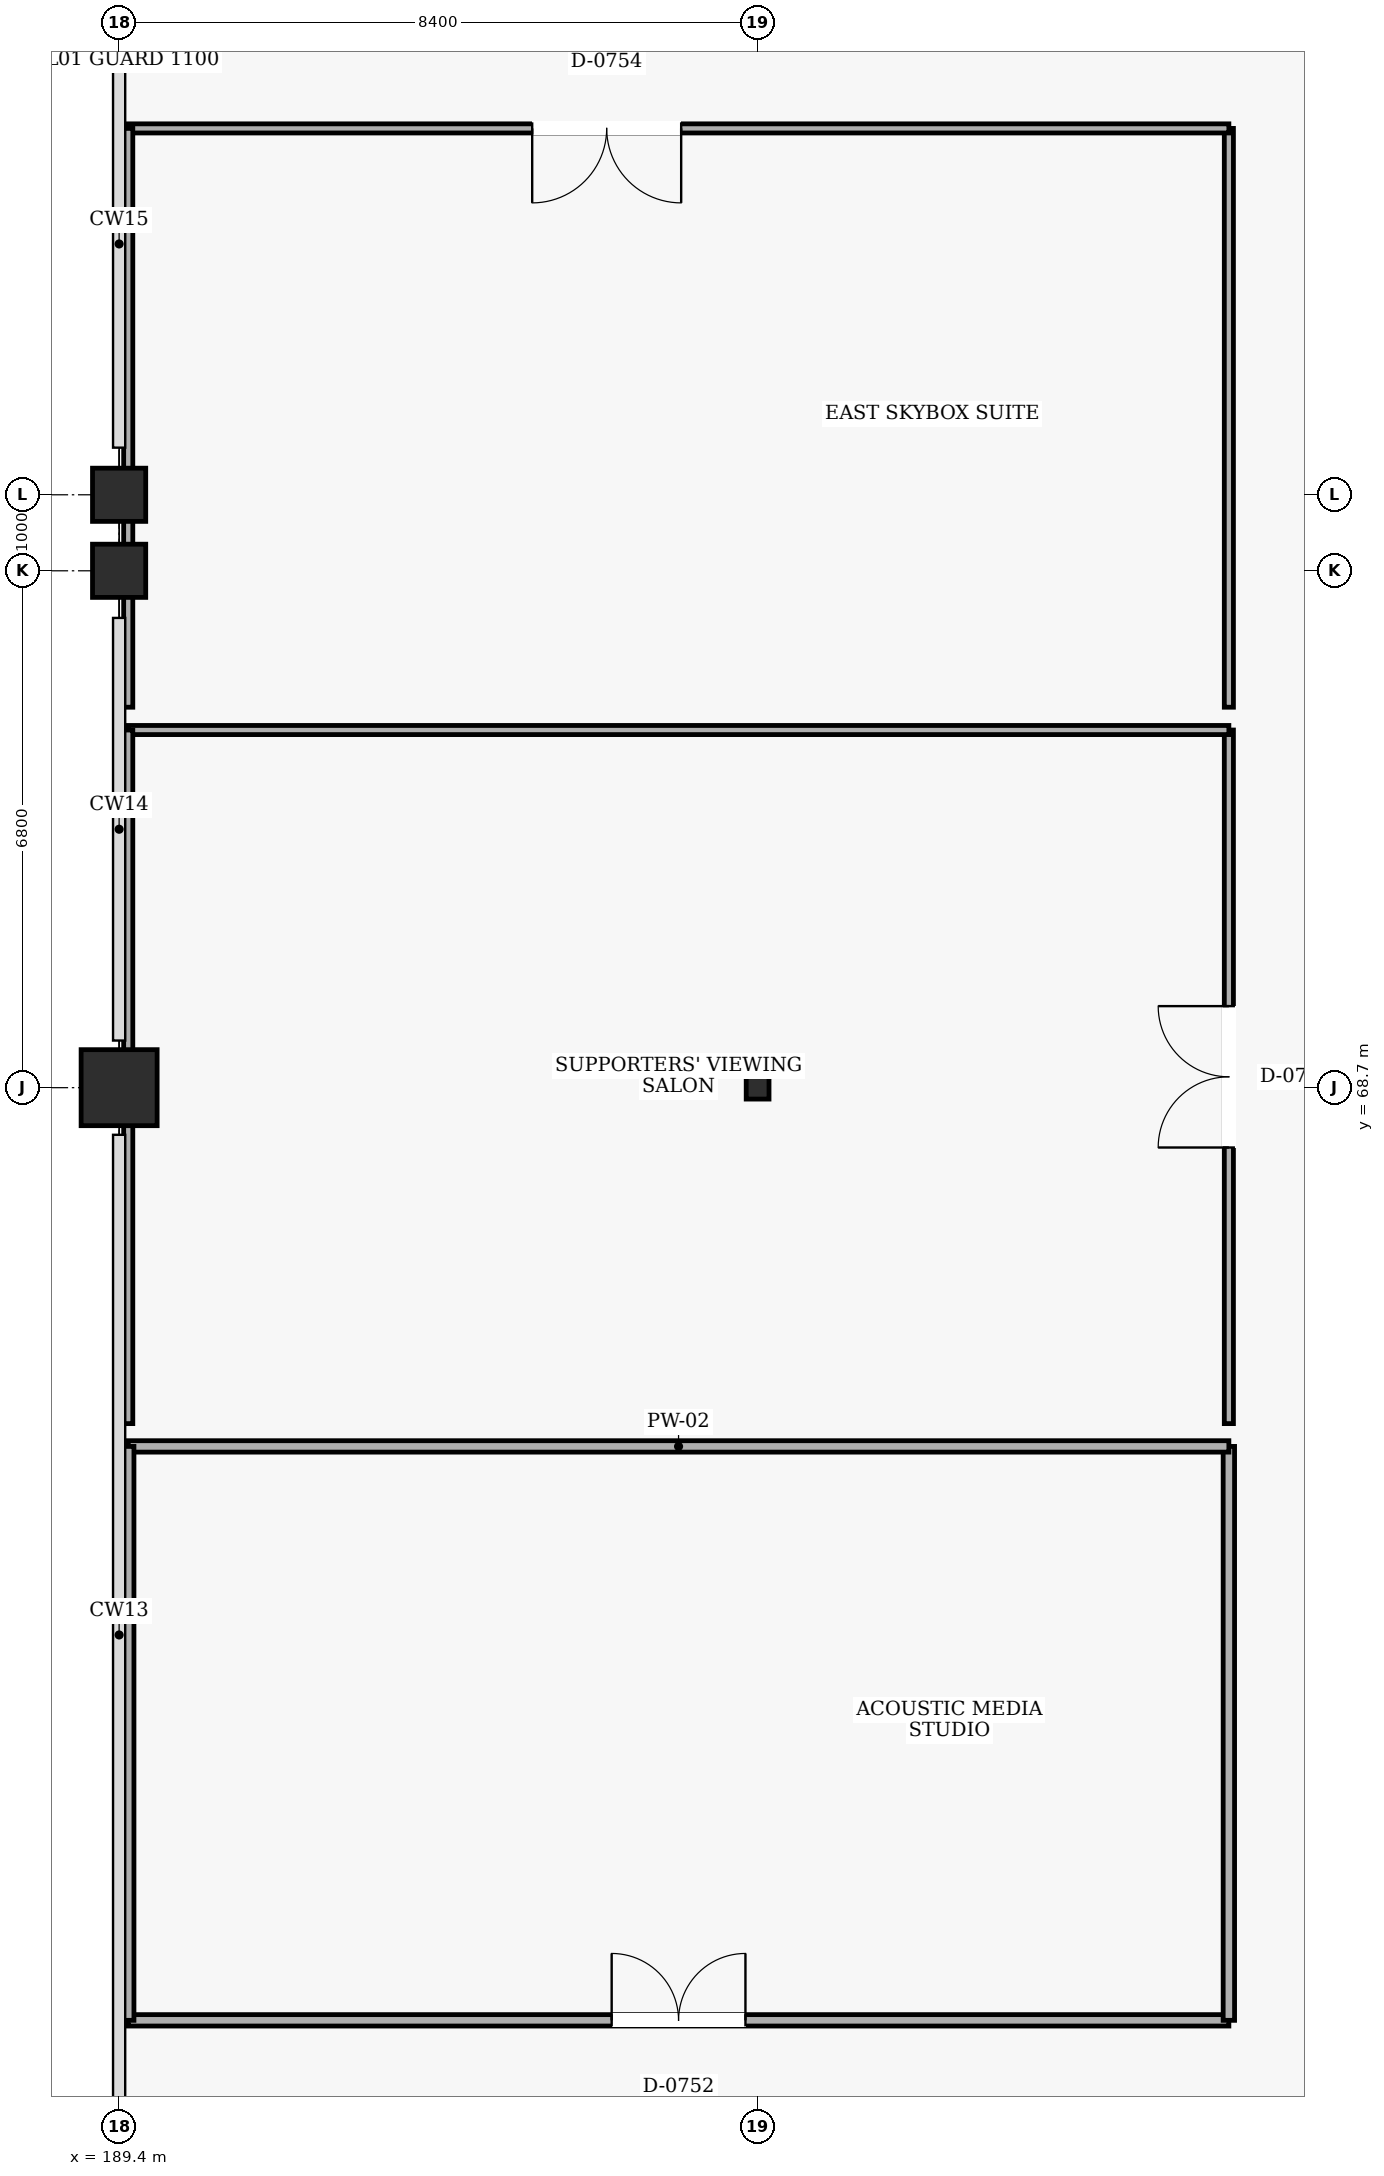
"""IFC4 building model, lengths in metres.
Left out: names, types, materials, properties, quantities, classifications, styles, units other than length and angle.
Written with IfcOpenShell. Run it as: python <this file> out.ifc"""

import sys

from ifc_helpers import new_model, si_unit, direction, frame, frame_2d, origin, origin_2d, place, context, subcontext, project, spatial, rectangle, hollow_rectangle, extrude, element, fill, save


model = new_model("IFC4")
c1 = context("Model", 3, precision=1e-05, world=origin(), true_north=direction((0.0, 1.0)))
c2 = subcontext(c1, "Body", "Model", "MODEL_VIEW")
j1 = project(units=[si_unit("LENGTHUNIT", "METRE"), si_unit("PLANEANGLEUNIT", "RADIAN")], contexts=[c1])
p1 = place(None, origin())
s1 = spatial("IfcSite", under=j1, at=p1, CompositionType="ELEMENT")
p2 = place(p1, origin())
s2 = spatial("IfcBuilding", under=s1, at=p2, CompositionType="ELEMENT")
p3 = place(p2, frame((0.0, 0.0, 19.8)))
s3 = spatial("IfcBuildingStorey", under=s2, at=p3, CompositionType="ELEMENT", Elevation=19.8)
p4 = place(p3, frame((189.4, 68.7, 0.0), z_axis=(0.0, 0.0, 1.0), x_axis=(1.0, 0.0, 0.0)))
e1 = element("IfcColumn", 1, at=p4, inside=s3, PredefinedType="COLUMN", context=c2, shape_type="SweptSolid", body=[
    extrude(rectangle(XDim=1.0, YDim=1.0, at=origin_2d()), origin(), (0.0, 0.0, 1.0), 4.8),
])
for number, where, z_axis, x_axis in (
    (2, (189.4, 75.5, 0.0), (0.0, 0.0, 1.0), (1.0, 0.0, 0.0)),
    (3, (189.4, 76.5, 0.0), (0.0, 0.0, 1.0), (1.0, 0.0, 0.0)),
):
    element("IfcColumn", number, at=place(p3, frame(where, z_axis=z_axis, x_axis=x_axis)), inside=s3, PredefinedType="COLUMN", context=c2, shape_type="SweptSolid", body=[
        extrude(rectangle(XDim=0.7, YDim=0.7, at=origin_2d()), origin(), (0.0, 0.0, 1.0), 4.8),
    ])
p5 = place(p3, frame((197.8, 68.7, 0.0), z_axis=(0.0, 0.0, 1.0), x_axis=(1.0, 0.0, 0.0)))
e4 = element("IfcColumn", 4, at=p5, inside=s3, PredefinedType="COLUMN", context=c2, shape_type="SweptSolid", body=[
    extrude(hollow_rectangle(XDim=0.3, YDim=0.3, WallThickness=0.016, at=origin_2d()), origin(), (0.0, 0.0, 1.0), 4.8),
])
p6 = place(p3, frame((189.52, 56.43, 0.0), z_axis=(0.0, 0.0, 1.0), x_axis=(1.0, 0.0, 0.0)))
e5 = element("IfcWall", 5, at=p6, inside=s3, PredefinedType="PARTITIONING", context=c2, shape_type="SweptSolid", body=[
    extrude(rectangle(XDim=14.48, YDim=0.15, at=frame_2d((7.24, 0.0))), origin(), (0.0, 0.0, 1.0), 4.5),
])
p7 = place(p6, frame((6.36, 0.0, 0.0)))
e6 = element("IfcOpeningElement", 6, at=p7, cuts=e5, PredefinedType="OPENING", context=c2, shape_type="SweptSolid", body=[
    extrude(rectangle(XDim=1.76, YDim=2.25, at=frame_2d((0.88, 1.125))), frame((0.0, 0.085, 0.0), z_axis=(0.0, -1.0, 0.0), x_axis=(1.0, 0.0, 0.0)), (0.0, 0.0, 1.0), 0.17),
])
p8 = place(p3, frame((204.0, 56.43, 0.0), z_axis=(0.0, 0.0, 1.0), x_axis=(0.0, 1.0, 0.0)))
e7 = element("IfcWall", 7, at=p8, inside=s3, PredefinedType="PARTITIONING", context=c2, shape_type="SweptSolid", body=[
    extrude(rectangle(XDim=7.551, YDim=0.15, at=frame_2d((3.775, 0.0))), origin(), (0.0, 0.0, 1.0), 4.5),
])
p9 = place(p3, frame((204.0, 63.98, 0.0), z_axis=(0.0, 0.0, 1.0), x_axis=(-1.0, 0.0, 0.0)))
e8 = element("IfcWall", 8, at=p9, inside=s3, PredefinedType="PARTITIONING", context=c2, shape_type="SweptSolid", body=[
    extrude(rectangle(XDim=14.48, YDim=0.15, at=frame_2d((7.24, 0.0))), origin(), (0.0, 0.0, 1.0), 4.5),
])
p10 = place(p3, frame((189.52, 63.98, 0.0), z_axis=(0.0, 0.0, 1.0), x_axis=(0.0, -1.0, 0.0)))
e9 = element("IfcWall", 9, at=p10, inside=s3, PredefinedType="PARTITIONING", context=c2, shape_type="SweptSolid", body=[
    extrude(rectangle(XDim=7.551, YDim=0.15, at=frame_2d((3.775, 0.0))), origin(), (0.0, 0.0, 1.0), 4.5),
])
p11 = place(p3, frame((204.0, 64.281, 0.0), z_axis=(0.0, 0.0, 1.0), x_axis=(0.0, 1.0, 0.0)))
e10 = element("IfcWall", 10, at=p11, inside=s3, PredefinedType="PARTITIONING", context=c2, shape_type="SweptSolid", body=[
    extrude(rectangle(XDim=9.125, YDim=0.12, at=frame_2d((4.562, 0.0))), origin(), (0.0, 0.0, 1.0), 4.5),
])
p12 = place(p11, frame((3.632, 0.0, 0.0)))
e11 = element("IfcOpeningElement", 11, at=p12, cuts=e10, PredefinedType="OPENING", context=c2, shape_type="SweptSolid", body=[
    extrude(rectangle(XDim=1.86, YDim=2.3, at=frame_2d((0.93, 1.15))), frame((0.0, 0.07, 0.0), z_axis=(0.0, -1.0, 0.0), x_axis=(1.0, 0.0, 0.0)), (0.0, 0.0, 1.0), 0.14),
])
p13 = place(p3, frame((204.0, 73.405, 0.0), z_axis=(0.0, 0.0, 1.0), x_axis=(-1.0, 0.0, 0.0)))
e12 = element("IfcWall", 12, at=p13, inside=s3, PredefinedType="PARTITIONING", context=c2, shape_type="SweptSolid", body=[
    extrude(rectangle(XDim=14.48, YDim=0.12, at=frame_2d((7.24, 0.0))), origin(), (0.0, 0.0, 1.0), 4.5),
])
p14 = place(p3, frame((189.52, 73.405, 0.0), z_axis=(0.0, 0.0, 1.0), x_axis=(0.0, -1.0, 0.0)))
e13 = element("IfcWall", 13, at=p14, inside=s3, PredefinedType="PARTITIONING", context=c2, shape_type="SweptSolid", body=[
    extrude(rectangle(XDim=9.125, YDim=0.12, at=frame_2d((4.562, 0.0))), origin(), (0.0, 0.0, 1.0), 4.5),
])
p15 = place(p3, frame((204.0, 73.705, 0.0), z_axis=(0.0, 0.0, 1.0), x_axis=(0.0, 1.0, 0.0)))
e14 = element("IfcWall", 14, at=p15, inside=s3, PredefinedType="PARTITIONING", context=c2, shape_type="SweptSolid", body=[
    extrude(rectangle(XDim=7.615, YDim=0.12, at=frame_2d((3.808, 0.0))), origin(), (0.0, 0.0, 1.0), 4.5),
])
p16 = place(p3, frame((204.0, 81.32, 0.0), z_axis=(0.0, 0.0, 1.0), x_axis=(-1.0, 0.0, 0.0)))
e15 = element("IfcWall", 15, at=p16, inside=s3, PredefinedType="PARTITIONING", context=c2, shape_type="SweptSolid", body=[
    extrude(rectangle(XDim=14.48, YDim=0.12, at=frame_2d((7.24, 0.0))), origin(), (0.0, 0.0, 1.0), 4.5),
])
p17 = place(p16, frame((7.206, 0.0, 0.0)))
e16 = element("IfcOpeningElement", 16, at=p17, cuts=e15, PredefinedType="OPENING", context=c2, shape_type="SweptSolid", body=[
    extrude(rectangle(XDim=1.96, YDim=2.3, at=frame_2d((0.98, 1.15))), frame((0.0, 0.07, 0.0), z_axis=(0.0, -1.0, 0.0), x_axis=(1.0, 0.0, 0.0)), (0.0, 0.0, 1.0), 0.14),
])
p18 = place(p3, frame((189.52, 81.32, 0.0), z_axis=(0.0, 0.0, 1.0), x_axis=(0.0, -1.0, 0.0)))
e17 = element("IfcWall", 17, at=p18, inside=s3, PredefinedType="PARTITIONING", context=c2, shape_type="SweptSolid", body=[
    extrude(rectangle(XDim=7.615, YDim=0.12, at=frame_2d((3.808, 0.0))), origin(), (0.0, 0.0, 1.0), 4.5),
])
p19 = place(p7, origin())
e18 = element("IfcDoor", 18, at=p19, inside=s3, OperationType="DOUBLE_DOOR_SINGLE_SWING", PredefinedType="DOOR", context=c2, shape_type="SweptSolid", body=[
    extrude(rectangle(XDim=1.76, YDim=2.25, at=frame_2d((0.88, 1.125))), frame((0.0, 0.025, 0.0), z_axis=(0.0, -1.0, 0.0), x_axis=(1.0, 0.0, 0.0)), (0.0, 0.0, 1.0), 0.05),
])
fill(e6, e18)
p20 = place(p12, origin())
e19 = element("IfcDoor", 19, at=p20, inside=s3, OperationType="DOUBLE_DOOR_SINGLE_SWING", PredefinedType="DOOR", context=c2, shape_type="SweptSolid", body=[
    extrude(rectangle(XDim=1.86, YDim=2.3, at=frame_2d((0.93, 1.15))), frame((0.0, 0.025, 0.0), z_axis=(0.0, -1.0, 0.0), x_axis=(1.0, 0.0, 0.0)), (0.0, 0.0, 1.0), 0.05),
])
fill(e11, e19)
p21 = place(p17, origin())
e20 = element("IfcDoor", 20, at=p21, inside=s3, OperationType="DOUBLE_DOOR_SINGLE_SWING", PredefinedType="DOOR", context=c2, shape_type="SweptSolid", body=[
    extrude(rectangle(XDim=1.96, YDim=2.3, at=frame_2d((0.98, 1.15))), frame((0.0, 0.025, 0.0), z_axis=(0.0, -1.0, 0.0), x_axis=(1.0, 0.0, 0.0)), (0.0, 0.0, 1.0), 0.05),
])
fill(e16, e20)
save(model, sys.argv[1])
